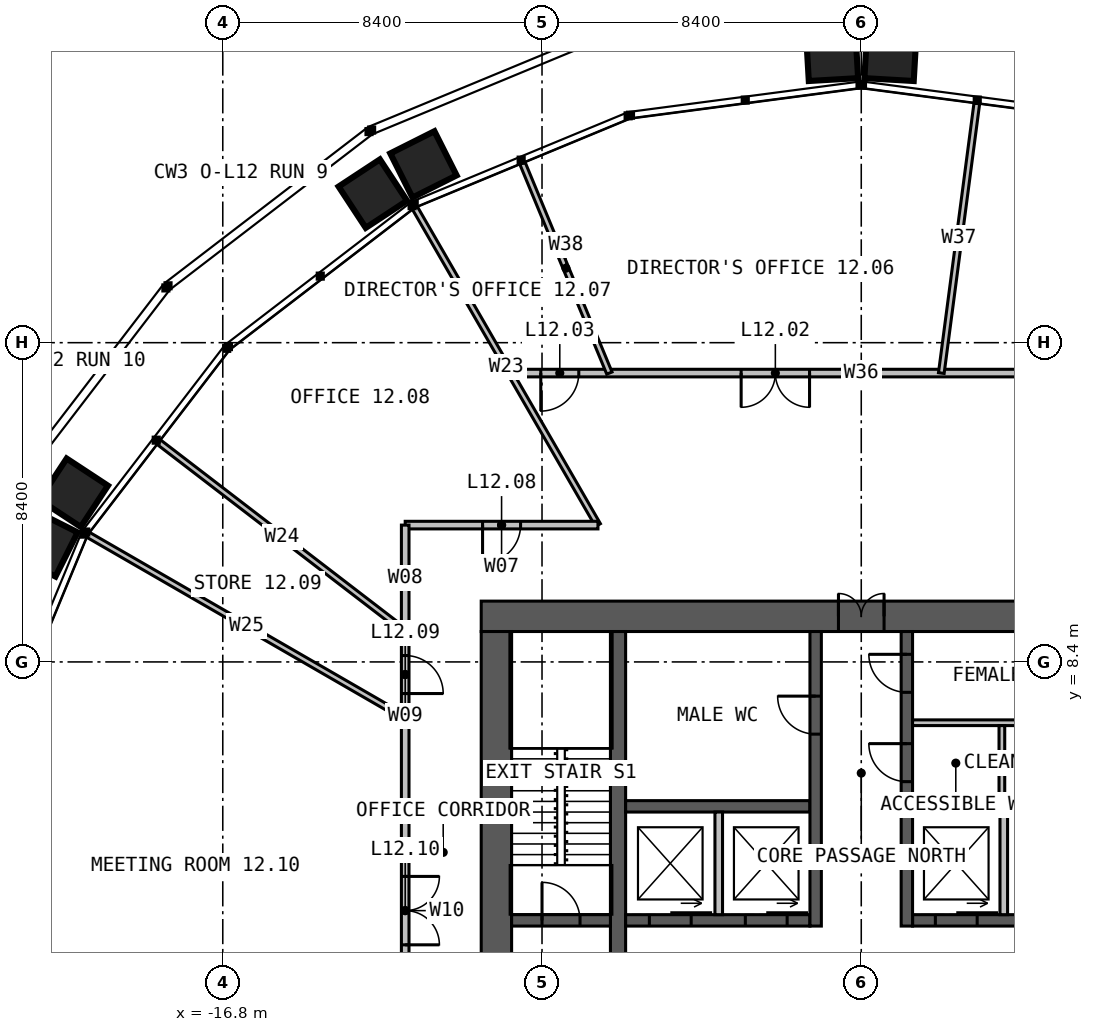
"""IFC4 building model, lengths in metres.
Left out: names, types, materials, properties, quantities, classifications, styles, units other than length and angle.
Written with IfcOpenShell. Run it as: python <this file> out.ifc"""

import sys

from ifc_helpers import new_model, si_unit, direction, frame, frame_2d, origin, place, context, subcontext, project, spatial, rectangle, extrude, element, fill, save


model = new_model("IFC4")
c1 = context("Model", 3, precision=1e-05, world=origin(), true_north=direction((0.0, 1.0)))
c2 = subcontext(c1, "Body", "Model", "MODEL_VIEW")
j1 = project(units=[si_unit("LENGTHUNIT", "METRE"), si_unit("PLANEANGLEUNIT", "RADIAN")], contexts=[c1])
p1 = place(None, origin())
s1 = spatial("IfcSite", under=j1, at=p1, CompositionType="ELEMENT")
p2 = place(p1, origin())
s2 = spatial("IfcBuilding", under=s1, at=p2, CompositionType="ELEMENT")
p3 = place(p2, frame((0.0, 0.0, 53.0)))
s3 = spatial("IfcBuildingStorey", under=s2, at=p3, CompositionType="ELEMENT", Elevation=53.0)
p4 = place(p3, frame((-10.0, 9.6, 0.0), z_axis=(0.0, 0.0, 1.0), x_axis=(1.0, 0.0, 0.0)))
e1 = element("IfcWall", 1, at=p4, inside=s3, PredefinedType="SOLIDWALL", context=c2, shape_type="SweptSolid", body=[
    extrude(rectangle(XDim=20.0, YDim=0.8, at=frame_2d((10.0, 0.0))), origin(), (0.0, 0.0, 1.0), 4.0),
])
p5 = place(p4, frame((9.4, 0.0, 0.0)))
e2 = element("IfcOpeningElement", 2, at=p5, cuts=e1, PredefinedType="OPENING", context=c2, shape_type="SweptSolid", body=[
    extrude(rectangle(XDim=1.2, YDim=2.2, at=frame_2d((0.6, 1.1))), frame((0.0, 0.41, 0.0), z_axis=(0.0, -1.0, 0.0), x_axis=(1.0, 0.0, 0.0)), (0.0, 0.0, 1.0), 0.82),
])
p6 = place(p3, frame((-9.6, 9.2, 0.0), z_axis=(0.0, 0.0, 1.0), x_axis=(0.0, -1.0, 0.0)))
e3 = element("IfcWall", 3, at=p6, inside=s3, PredefinedType="SOLIDWALL", context=c2, shape_type="SweptSolid", body=[
    extrude(rectangle(XDim=18.4, YDim=0.8, at=frame_2d((9.2, 0.0))), origin(), (0.0, 0.0, 1.0), 4.0),
])
p7 = place(p3, frame((-6.4, -9.2, 0.0), z_axis=(0.0, 0.0, 1.0), x_axis=(0.0, 1.0, 0.0)))
e4 = element("IfcWall", 4, at=p7, inside=s3, PredefinedType="SOLIDWALL", context=c2, shape_type="SweptSolid", body=[
    extrude(rectangle(XDim=18.4, YDim=0.4, at=frame_2d((9.2, 0.0))), origin(), (0.0, 0.0, 1.0), 4.0),
])
p8 = place(p7, frame((8.7, 0.0, 0.0)))
e5 = element("IfcOpeningElement", 5, at=p8, cuts=e4, PredefinedType="OPENING", context=c2, shape_type="SweptSolid", body=[
    extrude(rectangle(XDim=1.0, YDim=2.2, at=frame_2d((0.5, 1.1))), frame((0.0, 0.21, 0.0), z_axis=(0.0, -1.0, 0.0), x_axis=(1.0, 0.0, 0.0)), (0.0, 0.0, 1.0), 0.42),
])
p9 = place(p3, frame((-6.2, 1.6, 0.0), z_axis=(0.0, 0.0, 1.0), x_axis=(1.0, 0.0, 0.0)))
e6 = element("IfcWall", 6, at=p9, inside=s3, PredefinedType="SOLIDWALL", context=c2, shape_type="SweptSolid", body=[
    extrude(rectangle(XDim=4.85, YDim=0.3, at=frame_2d((2.425, 0.0))), origin(), (0.0, 0.0, 1.0), 4.0),
])
p10 = place(p9, frame((0.625, 0.0, 0.0)))
e7 = element("IfcOpeningElement", 7, at=p10, cuts=e6, PredefinedType="OPENING", context=c2, shape_type="SweptSolid", body=[
    extrude(rectangle(XDim=1.1, YDim=2.2, at=frame_2d((0.55, 1.1))), frame((0.0, 0.16, 0.0), z_axis=(0.0, -1.0, 0.0), x_axis=(1.0, 0.0, 0.0)), (0.0, 0.0, 1.0), 0.32),
])
p11 = place(p9, frame((3.15, 0.0, 0.0)))
e8 = element("IfcOpeningElement", 8, at=p11, cuts=e6, PredefinedType="OPENING", context=c2, shape_type="SweptSolid", body=[
    extrude(rectangle(XDim=1.1, YDim=2.2, at=frame_2d((0.55, 1.1))), frame((0.0, 0.16, 0.0), z_axis=(0.0, -1.0, 0.0), x_axis=(1.0, 0.0, 0.0)), (0.0, 0.0, 1.0), 0.32),
])
p12 = place(p3, frame((1.35, 1.6, 0.0), z_axis=(0.0, 0.0, 1.0), x_axis=(1.0, 0.0, 0.0)))
e9 = element("IfcWall", 9, at=p12, inside=s3, PredefinedType="SOLIDWALL", context=c2, shape_type="SweptSolid", body=[
    extrude(rectangle(XDim=4.85, YDim=0.3, at=frame_2d((2.425, 0.0))), origin(), (0.0, 0.0, 1.0), 4.0),
])
p13 = place(p12, frame((0.6, 0.0, 0.0)))
e10 = element("IfcOpeningElement", 10, at=p13, cuts=e9, PredefinedType="OPENING", context=c2, shape_type="SweptSolid", body=[
    extrude(rectangle(XDim=1.1, YDim=2.2, at=frame_2d((0.55, 1.1))), frame((0.0, 0.16, 0.0), z_axis=(0.0, -1.0, 0.0), x_axis=(1.0, 0.0, 0.0)), (0.0, 0.0, 1.0), 0.32),
])
p14 = place(p12, frame((3.125, 0.0, 0.0)))
e11 = element("IfcOpeningElement", 11, at=p14, cuts=e9, PredefinedType="OPENING", context=c2, shape_type="SweptSolid", body=[
    extrude(rectangle(XDim=1.1, YDim=2.2, at=frame_2d((0.55, 1.1))), frame((0.0, 0.16, 0.0), z_axis=(0.0, -1.0, 0.0), x_axis=(1.0, 0.0, 0.0)), (0.0, 0.0, 1.0), 0.32),
])
for number, where, z_axis, x_axis in (
    (12, (-6.2, 4.6, 0.0), (0.0, 0.0, 1.0), (1.0, 0.0, 0.0)),
    (13, (1.35, 4.6, 0.0), (0.0, 0.0, 1.0), (1.0, 0.0, 0.0)),
):
    element("IfcWall", number, at=place(p3, frame(where, z_axis=z_axis, x_axis=x_axis)), inside=s3, PredefinedType="SOLIDWALL", context=c2, shape_type="SweptSolid", body=[
        extrude(rectangle(XDim=4.85, YDim=0.3, at=frame_2d((2.425, 0.0))), origin(), (0.0, 0.0, 1.0), 4.0),
    ])
p15 = place(p3, frame((-1.2, 1.45, 0.0), z_axis=(0.0, 0.0, 1.0), x_axis=(0.0, 1.0, 0.0)))
e14 = element("IfcWall", 14, at=p15, inside=s3, PredefinedType="SOLIDWALL", context=c2, shape_type="SweptSolid", body=[
    extrude(rectangle(XDim=7.75, YDim=0.3, at=frame_2d((3.875, 0.0))), origin(), (0.0, 0.0, 1.0), 4.0),
])
p16 = place(p15, frame((5.05, 0.0, 0.0)))
e15 = element("IfcOpeningElement", 15, at=p16, cuts=e14, PredefinedType="OPENING", context=c2, shape_type="SweptSolid", body=[
    extrude(rectangle(XDim=1.0, YDim=2.2, at=frame_2d((0.5, 1.1))), frame((0.0, 0.16, 0.0), z_axis=(0.0, -1.0, 0.0), x_axis=(1.0, 0.0, 0.0)), (0.0, 0.0, 1.0), 0.32),
])
p17 = place(p3, frame((1.2, 1.45, 0.0), z_axis=(0.0, 0.0, 1.0), x_axis=(0.0, 1.0, 0.0)))
e16 = element("IfcWall", 16, at=p17, inside=s3, PredefinedType="SOLIDWALL", context=c2, shape_type="SweptSolid", body=[
    extrude(rectangle(XDim=7.75, YDim=0.3, at=frame_2d((3.875, 0.0))), origin(), (0.0, 0.0, 1.0), 4.0),
])
p18 = place(p17, frame((3.8, 0.0, 0.0)))
e17 = element("IfcOpeningElement", 17, at=p18, cuts=e16, PredefinedType="OPENING", context=c2, shape_type="SweptSolid", body=[
    extrude(rectangle(XDim=1.0, YDim=2.2, at=frame_2d((0.5, 1.1))), frame((0.0, 0.16, 0.0), z_axis=(0.0, -1.0, 0.0), x_axis=(1.0, 0.0, 0.0)), (0.0, 0.0, 1.0), 0.32),
])
p19 = place(p17, frame((6.15, 0.0, 0.0)))
e18 = element("IfcOpeningElement", 18, at=p19, cuts=e16, PredefinedType="OPENING", context=c2, shape_type="SweptSolid", body=[
    extrude(rectangle(XDim=1.0, YDim=2.2, at=frame_2d((0.5, 1.1))), frame((0.0, 0.16, 0.0), z_axis=(0.0, -1.0, 0.0), x_axis=(1.0, 0.0, 0.0)), (0.0, 0.0, 1.0), 0.32),
])
p20 = place(p3, frame((-9.2, 1.6, 0.0), z_axis=(0.0, 0.0, 1.0), x_axis=(1.0, 0.0, 0.0)))
e19 = element("IfcWall", 19, at=p20, inside=s3, PredefinedType="SOLIDWALL", context=c2, shape_type="SweptSolid", body=[
    extrude(rectangle(XDim=2.6, YDim=0.3, at=frame_2d((1.3, 0.0))), origin(), (0.0, 0.0, 1.0), 4.0),
])
p21 = place(p20, frame((0.8, 0.0, 0.0)))
e20 = element("IfcOpeningElement", 20, at=p21, cuts=e19, PredefinedType="OPENING", context=c2, shape_type="SweptSolid", body=[
    extrude(rectangle(XDim=1.0, YDim=2.2, at=frame_2d((0.5, 1.1))), frame((0.0, 0.16, 0.0), z_axis=(0.0, -1.0, 0.0), x_axis=(1.0, 0.0, 0.0)), (0.0, 0.0, 1.0), 0.32),
])
for number, where, z_axis, x_axis in (
    (21, (-3.75, 1.75, 0.0), (0.0, 0.0, 1.0), (0.0, 1.0, 0.0)),
    (22, (3.75, 1.75, 0.0), (0.0, 0.0, 1.0), (0.0, 1.0, 0.0)),
):
    element("IfcWall", number, at=place(p3, frame(where, z_axis=z_axis, x_axis=x_axis)), inside=s3, PredefinedType="SOLIDWALL", context=c2, shape_type="SweptSolid", body=[
        extrude(rectangle(XDim=2.7, YDim=0.2, at=frame_2d((1.35, 0.0))), origin(), (0.0, 0.0, 1.0), 3.75),
    ])
p22 = place(p3, frame((1.35, 6.8, 0.0), z_axis=(0.0, 0.0, 1.0), x_axis=(1.0, 0.0, 0.0)))
e23 = element("IfcWall", 23, at=p22, inside=s3, PredefinedType="PARTITIONING", context=c2, shape_type="SweptSolid", body=[
    extrude(rectangle(XDim=4.85, YDim=0.15, at=frame_2d((2.425, 0.0))), origin(), (0.0, 0.0, 1.0), 3.75),
])
p23 = place(p22, frame((3.15, 0.0, 0.0)))
e24 = element("IfcOpeningElement", 24, at=p23, cuts=e23, PredefinedType="OPENING", context=c2, shape_type="SweptSolid", body=[
    extrude(rectangle(XDim=0.9, YDim=2.2, at=frame_2d((0.45, 1.1))), frame((0.0, 0.085, 0.0), z_axis=(0.0, -1.0, 0.0), x_axis=(1.0, 0.0, 0.0)), (0.0, 0.0, 1.0), 0.17),
])
p24 = place(p3, frame((3.7, 4.75, 0.0), z_axis=(0.0, 0.0, 1.0), x_axis=(0.0, 1.0, 0.0)))
e25 = element("IfcWall", 25, at=p24, inside=s3, PredefinedType="PARTITIONING", context=c2, shape_type="SweptSolid", body=[
    extrude(rectangle(XDim=1.975, YDim=0.15, at=frame_2d((0.988, 0.0))), origin(), (0.0, 0.0, 1.0), 3.75),
])
p25 = place(p3, frame((-6.928, 12.0, 0.0), z_axis=(0.0, 0.0, 1.0), x_axis=(-0.499991431567, 0.866030350715, 0.0)))
e26 = element("IfcWall", 26, at=p25, inside=s3, PredefinedType="PARTITIONING", context=c2, shape_type="SweptSolid", body=[
    extrude(rectangle(XDim=9.638, YDim=0.15, at=frame_2d((4.819, 0.0))), origin(), (0.0, 0.0, 1.0), 2.79),
])
p26 = place(p3, frame((-12.0, 9.208, 0.0), z_axis=(0.0, 0.0, 1.0), x_axis=(-0.793362371633, 0.608749658954, 0.0)))
e27 = element("IfcWall", 27, at=p26, inside=s3, PredefinedType="PARTITIONING", context=c2, shape_type="SweptSolid", body=[
    extrude(rectangle(XDim=8.167, YDim=0.15, at=frame_2d((4.084, 0.0))), origin(), (0.0, 0.0, 1.0), 2.79),
])
p27 = place(p3, frame((-12.0, 6.928, 0.0), z_axis=(0.0, 0.0, 1.0), x_axis=(-0.866030350715, 0.499991431567, 0.0)))
e28 = element("IfcWall", 28, at=p27, inside=s3, PredefinedType="PARTITIONING", context=c2, shape_type="SweptSolid", body=[
    extrude(rectangle(XDim=9.638, YDim=0.15, at=frame_2d((4.819, 0.0))), origin(), (0.0, 0.0, 1.0), 2.79),
])
p28 = place(p3, frame((9.238, 16.0, 0.0), z_axis=(0.0, 0.0, 1.0), x_axis=(-1.0, 0.0, 0.0)))
e29 = element("IfcWall", 29, at=p28, inside=s3, PredefinedType="PARTITIONING", context=c2, shape_type="SweptSolid", body=[
    extrude(rectangle(XDim=18.475, YDim=0.2, at=frame_2d((9.238, 0.0))), origin(), (0.0, 0.0, 1.0), 3.8),
])
p29 = place(p28, frame((3.066, 0.0, 0.0)))
e30 = element("IfcOpeningElement", 30, at=p29, cuts=e29, PredefinedType="OPENING", context=c2, shape_type="SweptSolid", body=[
    extrude(rectangle(XDim=1.0, YDim=2.2, at=frame_2d((0.5, 1.1))), frame((0.0, 0.11, 0.0), z_axis=(0.0, -1.0, 0.0), x_axis=(1.0, 0.0, 0.0)), (0.0, 0.0, 1.0), 0.22),
])
p30 = place(p28, frame((10.598, 0.0, 0.0)))
e31 = element("IfcOpeningElement", 31, at=p30, cuts=e29, PredefinedType="OPENING", context=c2, shape_type="SweptSolid", body=[
    extrude(rectangle(XDim=1.8, YDim=2.2, at=frame_2d((0.9, 1.1))), frame((0.0, 0.11, 0.0), z_axis=(0.0, -1.0, 0.0), x_axis=(1.0, 0.0, 0.0)), (0.0, 0.0, 1.0), 0.22),
])
p31 = place(p28, frame((16.67, 0.0, 0.0)))
e32 = element("IfcOpeningElement", 32, at=p31, cuts=e29, PredefinedType="OPENING", context=c2, shape_type="SweptSolid", body=[
    extrude(rectangle(XDim=1.0, YDim=2.2, at=frame_2d((0.5, 1.1))), frame((0.0, 0.11, 0.0), z_axis=(0.0, -1.0, 0.0), x_axis=(1.0, 0.0, 0.0)), (0.0, 0.0, 1.0), 0.22),
])
p32 = place(p3, frame((2.106, 16.0, 0.0), z_axis=(0.0, 0.0, 1.0), x_axis=(0.130511883532, 0.991446745043, 0.0)))
e33 = element("IfcWall", 33, at=p32, inside=s3, PredefinedType="PARTITIONING", context=c2, shape_type="SweptSolid", body=[
    extrude(rectangle(XDim=7.155, YDim=0.15, at=frame_2d((3.578, 0.0))), origin(), (0.0, 0.0, 1.0), 2.79),
])
p33 = place(p3, frame((-6.627, 16.0, 0.0), z_axis=(0.0, 0.0, 1.0), x_axis=(-0.382670574825, 0.923884858174, 0.0)))
e34 = element("IfcWall", 34, at=p33, inside=s3, PredefinedType="PARTITIONING", context=c2, shape_type="SweptSolid", body=[
    extrude(rectangle(XDim=5.975, YDim=0.15, at=frame_2d((2.987, 0.0))), origin(), (0.0, 0.0, 1.0), 2.79),
])
p34 = place(p3, frame((-6.928, 12.0, 0.0), z_axis=(0.0, 0.0, 1.0), x_axis=(-1.0, 0.0, 0.0)))
e35 = element("IfcWall", 35, at=p34, inside=s3, PredefinedType="PARTITIONING", context=c2, shape_type="SweptSolid", body=[
    extrude(rectangle(XDim=5.072, YDim=0.2, at=frame_2d((2.536, 0.0))), origin(), (0.0, 0.0, 1.0), 3.8),
])
p35 = place(p34, frame((2.036, 0.0, 0.0)))
e36 = element("IfcOpeningElement", 36, at=p35, cuts=e35, PredefinedType="OPENING", context=c2, shape_type="SweptSolid", body=[
    extrude(rectangle(XDim=1.0, YDim=2.2, at=frame_2d((0.5, 1.1))), frame((0.0, 0.11, 0.0), z_axis=(0.0, -1.0, 0.0), x_axis=(1.0, 0.0, 0.0)), (0.0, 0.0, 1.0), 0.22),
])
p36 = place(p3, frame((-12.0, 12.0, 0.0), z_axis=(0.0, 0.0, 1.0), x_axis=(0.0, -1.0, 0.0)))
e37 = element("IfcWall", 37, at=p36, inside=s3, PredefinedType="PARTITIONING", context=c2, shape_type="SweptSolid", body=[
    extrude(rectangle(XDim=2.792, YDim=0.2, at=frame_2d((1.396, 0.0))), origin(), (0.0, 0.0, 1.0), 3.8),
])
p37 = place(p3, frame((-12.0, 9.208, 0.0), z_axis=(0.0, 0.0, 1.0), x_axis=(0.0, -1.0, 0.0)))
e38 = element("IfcWall", 38, at=p37, inside=s3, PredefinedType="PARTITIONING", context=c2, shape_type="SweptSolid", body=[
    extrude(rectangle(XDim=2.28, YDim=0.2, at=frame_2d((1.14, 0.0))), origin(), (0.0, 0.0, 1.0), 3.8),
])
p38 = place(p37, frame((0.64, 0.0, 0.0)))
e39 = element("IfcOpeningElement", 39, at=p38, cuts=e38, PredefinedType="OPENING", context=c2, shape_type="SweptSolid", body=[
    extrude(rectangle(XDim=1.0, YDim=2.2, at=frame_2d((0.5, 1.1))), frame((0.0, 0.11, 0.0), z_axis=(0.0, -1.0, 0.0), x_axis=(1.0, 0.0, 0.0)), (0.0, 0.0, 1.0), 0.22),
])
p39 = place(p3, frame((-12.0, 6.928, 0.0), z_axis=(0.0, 0.0, 1.0), x_axis=(0.0, -1.0, 0.0)))
e40 = element("IfcWall", 40, at=p39, inside=s3, PredefinedType="PARTITIONING", context=c2, shape_type="SweptSolid", body=[
    extrude(rectangle(XDim=10.144, YDim=0.2, at=frame_2d((5.072, 0.0))), origin(), (0.0, 0.0, 1.0), 3.8),
])
p40 = place(p39, frame((4.172, 0.0, 0.0)))
e41 = element("IfcOpeningElement", 41, at=p40, cuts=e40, PredefinedType="OPENING", context=c2, shape_type="SweptSolid", body=[
    extrude(rectangle(XDim=1.8, YDim=2.2, at=frame_2d((0.9, 1.1))), frame((0.0, 0.11, 0.0), z_axis=(0.0, -1.0, 0.0), x_axis=(1.0, 0.0, 0.0)), (0.0, 0.0, 1.0), 0.22),
])
p41 = place(p5, origin())
e42 = element("IfcDoor", 42, at=p41, inside=s3, OperationType="DOUBLE_DOOR_SINGLE_SWING", PredefinedType="DOOR", context=c2, shape_type="SweptSolid", body=[
    extrude(rectangle(XDim=1.2, YDim=2.2, at=frame_2d((0.6, 1.1))), frame((0.0, 0.025, 0.0), z_axis=(0.0, -1.0, 0.0), x_axis=(1.0, 0.0, 0.0)), (0.0, 0.0, 1.0), 0.05),
])
fill(e2, e42)
p42 = place(p21, origin())
e43 = element("IfcDoor", 43, at=p42, inside=s3, OperationType="SINGLE_SWING_LEFT", PredefinedType="DOOR", context=c2, shape_type="SweptSolid", body=[
    extrude(rectangle(XDim=1.0, YDim=2.2, at=frame_2d((0.5, 1.1))), frame((0.0, 0.025, 0.0), z_axis=(0.0, -1.0, 0.0), x_axis=(1.0, 0.0, 0.0)), (0.0, 0.0, 1.0), 0.05),
])
fill(e20, e43)
p43 = place(p16, origin())
e44 = element("IfcDoor", 44, at=p43, inside=s3, OperationType="SINGLE_SWING_RIGHT", PredefinedType="DOOR", context=c2, shape_type="SweptSolid", body=[
    extrude(rectangle(XDim=1.0, YDim=2.2, at=frame_2d((0.5, 1.1))), frame((0.0, 0.025, 0.0), z_axis=(0.0, -1.0, 0.0), x_axis=(1.0, 0.0, 0.0)), (0.0, 0.0, 1.0), 0.05),
])
fill(e15, e44)
p44 = place(p18, origin())
e45 = element("IfcDoor", 45, at=p44, inside=s3, OperationType="SINGLE_SWING_RIGHT", PredefinedType="DOOR", context=c2, shape_type="SweptSolid", body=[
    extrude(rectangle(XDim=1.0, YDim=2.2, at=frame_2d((0.5, 1.1))), frame((0.0, 0.025, 0.0), z_axis=(0.0, -1.0, 0.0), x_axis=(1.0, 0.0, 0.0)), (0.0, 0.0, 1.0), 0.05),
])
fill(e17, e45)
p45 = place(p19, origin())
e46 = element("IfcDoor", 46, at=p45, inside=s3, OperationType="SINGLE_SWING_RIGHT", PredefinedType="DOOR", context=c2, shape_type="SweptSolid", body=[
    extrude(rectangle(XDim=1.0, YDim=2.2, at=frame_2d((0.5, 1.1))), frame((0.0, 0.025, 0.0), z_axis=(0.0, -1.0, 0.0), x_axis=(1.0, 0.0, 0.0)), (0.0, 0.0, 1.0), 0.05),
])
fill(e18, e46)
p46 = place(p10, origin())
e47 = element("IfcDoor", 47, at=p46, inside=s3, OperationType="SLIDING_TO_LEFT", PredefinedType="DOOR", context=c2, shape_type="SweptSolid", body=[
    extrude(rectangle(XDim=1.1, YDim=2.2, at=frame_2d((0.55, 1.1))), frame((0.0, 0.025, 0.0), z_axis=(0.0, -1.0, 0.0), x_axis=(1.0, 0.0, 0.0)), (0.0, 0.0, 1.0), 0.05),
])
fill(e7, e47)
p47 = place(p11, origin())
e48 = element("IfcDoor", 48, at=p47, inside=s3, OperationType="SLIDING_TO_LEFT", PredefinedType="DOOR", context=c2, shape_type="SweptSolid", body=[
    extrude(rectangle(XDim=1.1, YDim=2.2, at=frame_2d((0.55, 1.1))), frame((0.0, 0.025, 0.0), z_axis=(0.0, -1.0, 0.0), x_axis=(1.0, 0.0, 0.0)), (0.0, 0.0, 1.0), 0.05),
])
fill(e8, e48)
p48 = place(p13, origin())
e49 = element("IfcDoor", 49, at=p48, inside=s3, OperationType="SLIDING_TO_LEFT", PredefinedType="DOOR", context=c2, shape_type="SweptSolid", body=[
    extrude(rectangle(XDim=1.1, YDim=2.2, at=frame_2d((0.55, 1.1))), frame((0.0, 0.025, 0.0), z_axis=(0.0, -1.0, 0.0), x_axis=(1.0, 0.0, 0.0)), (0.0, 0.0, 1.0), 0.05),
])
fill(e10, e49)
p49 = place(p30, origin())
e50 = element("IfcDoor", 50, at=p49, inside=s3, OperationType="DOUBLE_DOOR_SINGLE_SWING", PredefinedType="DOOR", context=c2, shape_type="SweptSolid", body=[
    extrude(rectangle(XDim=1.8, YDim=2.2, at=frame_2d((0.9, 1.1))), frame((0.0, 0.025, 0.0), z_axis=(0.0, -1.0, 0.0), x_axis=(1.0, 0.0, 0.0)), (0.0, 0.0, 1.0), 0.05),
])
fill(e31, e50)
p50 = place(p31, origin())
e51 = element("IfcDoor", 51, at=p50, inside=s3, OperationType="SINGLE_SWING_RIGHT", PredefinedType="DOOR", context=c2, shape_type="SweptSolid", body=[
    extrude(rectangle(XDim=1.0, YDim=2.2, at=frame_2d((0.5, 1.1))), frame((0.0, 0.025, 0.0), z_axis=(0.0, -1.0, 0.0), x_axis=(1.0, 0.0, 0.0)), (0.0, 0.0, 1.0), 0.05),
])
fill(e32, e51)
p51 = place(p35, origin())
e52 = element("IfcDoor", 52, at=p51, inside=s3, OperationType="SINGLE_SWING_RIGHT", PredefinedType="DOOR", context=c2, shape_type="SweptSolid", body=[
    extrude(rectangle(XDim=1.0, YDim=2.2, at=frame_2d((0.5, 1.1))), frame((0.0, 0.025, 0.0), z_axis=(0.0, -1.0, 0.0), x_axis=(1.0, 0.0, 0.0)), (0.0, 0.0, 1.0), 0.05),
])
fill(e36, e52)
p52 = place(p38, origin())
e53 = element("IfcDoor", 53, at=p52, inside=s3, OperationType="SINGLE_SWING_RIGHT", PredefinedType="DOOR", context=c2, shape_type="SweptSolid", body=[
    extrude(rectangle(XDim=1.0, YDim=2.2, at=frame_2d((0.5, 1.1))), frame((0.0, 0.025, 0.0), z_axis=(0.0, -1.0, 0.0), x_axis=(1.0, 0.0, 0.0)), (0.0, 0.0, 1.0), 0.05),
])
fill(e39, e53)
p53 = place(p40, origin())
e54 = element("IfcDoor", 54, at=p53, inside=s3, OperationType="DOUBLE_DOOR_SINGLE_SWING", PredefinedType="DOOR", context=c2, shape_type="SweptSolid", body=[
    extrude(rectangle(XDim=1.8, YDim=2.2, at=frame_2d((0.9, 1.1))), frame((0.0, 0.025, 0.0), z_axis=(0.0, -1.0, 0.0), x_axis=(1.0, 0.0, 0.0)), (0.0, 0.0, 1.0), 0.05),
])
fill(e41, e54)
save(model, sys.argv[1])
